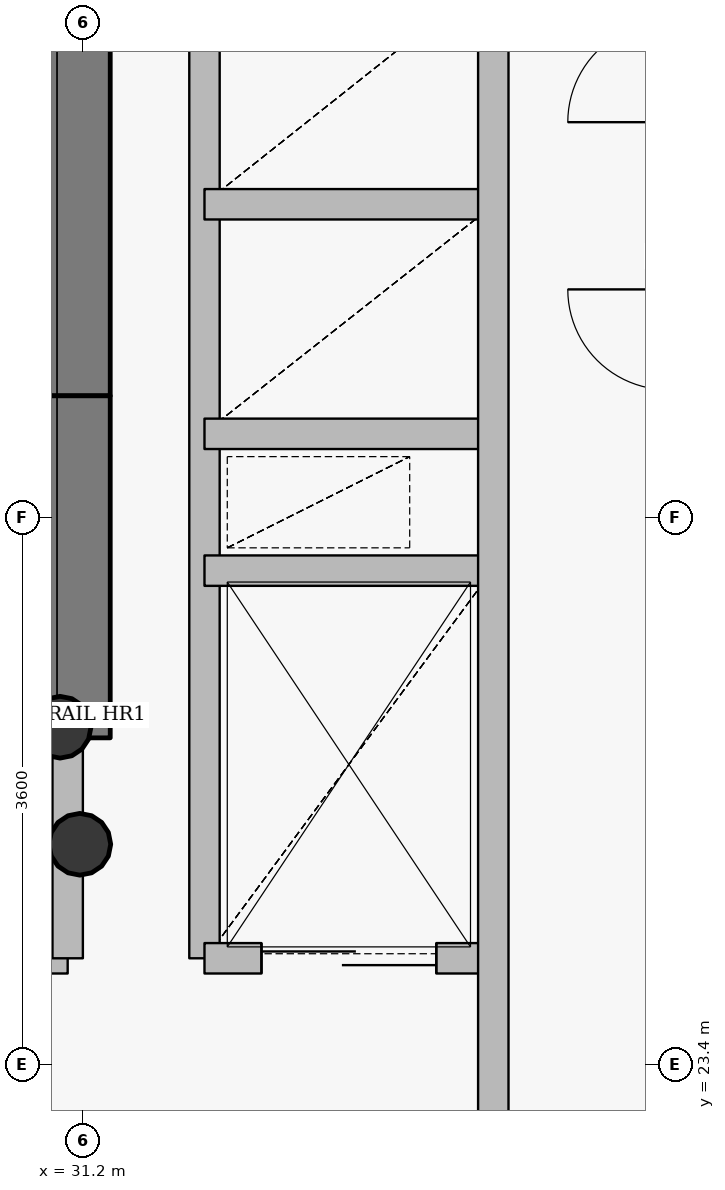
"""IFC4 building model, lengths in metres.
Left out: names, types, materials, properties, quantities, classifications, styles, units other than length and angle.
Written with IfcOpenShell. Run it as: python <this file> out.ifc"""

import sys

from ifc_helpers import new_model, si_unit, direction, frame, frame_2d, origin, origin_2d, place, context, subcontext, project, spatial, rectangle, hollow_circle, extrude, source, transform, mapped, element, fill, save


model = new_model("IFC4")
c1 = context("Model", 3, precision=1e-05, world=origin(), true_north=direction((0.0, 1.0)))
c2 = subcontext(c1, "Body", "Model", "MODEL_VIEW")
j1 = project(units=[si_unit("LENGTHUNIT", "METRE"), si_unit("PLANEANGLEUNIT", "RADIAN")], contexts=[c1])
p1 = place(None, origin())
s1 = spatial("IfcSite", under=j1, at=p1, CompositionType="ELEMENT")
p2 = place(p1, origin())
s2 = spatial("IfcBuilding", under=s1, at=p2, CompositionType="ELEMENT")
p3 = place(p2, frame((0.0, 0.0, 66.0)))
s3 = spatial("IfcBuildingStorey", under=s2, at=p3, CompositionType="ELEMENT", Elevation=66.0)
p4 = place(p3, frame((31.18, 27.8, 0.0), z_axis=(0.0, 0.0, 1.0), x_axis=(0.0, 1.0, 0.0)))
e1 = element("IfcWall", 1, at=p4, inside=s3, PredefinedType="SHEAR", context=c2, shape_type="SweptSolid", body=[
    extrude(rectangle(XDim=4.9, YDim=0.4, at=frame_2d((2.45, 0.0))), origin(), (0.0, 0.0, 1.0), 4.2),
])
for number, where, z_axis, x_axis in (
    (2, (31.05, 25.62, 0.0), (0.0, 0.0, 1.0), (1.0, 0.0, 0.0)),
    (3, (31.18, 24.85, 0.0), (0.0, 0.0, 1.0), (1.0, 0.0, 0.0)),
):
    element("IfcColumn", number, at=place(p3, frame(where, z_axis=z_axis, x_axis=x_axis)), inside=s3, PredefinedType="COLUMN", context=c2, shape_type="SweptSolid", body=[
        extrude(hollow_circle(Radius=0.203, WallThickness=0.016, at=origin_2d()), origin(), (0.0, 0.0, 1.0), 4.2),
    ])
p5 = place(p3, frame((31.18, 25.55, 0.0), z_axis=(0.0, 0.0, 1.0), x_axis=(0.0, 1.0, 0.0)))
e4 = element("IfcWall", 4, at=p5, inside=s3, PredefinedType="SHEAR", context=c2, shape_type="SweptSolid", body=[
    extrude(rectangle(XDim=2.25, YDim=0.4, at=frame_2d((1.125, 0.0))), origin(), (0.0, 0.0, 1.0), 3.55),
])
p6 = place(p3, frame((27.56, 24.1, 0.0), z_axis=(0.0, 0.0, 1.0), x_axis=(1.0, 0.0, 0.0)))
e5 = element("IfcWall", 5, at=p6, inside=s3, PredefinedType="PARTITIONING", context=c2, shape_type="SweptSolid", body=[
    extrude(rectangle(XDim=3.54, YDim=0.2, at=frame_2d((1.77, 0.0))), origin(), (0.0, 0.0, 1.0), 3.95),
])
p7 = place(p6, frame((1.17, 0.0, 0.0)))
e6 = element("IfcOpeningElement", 6, at=p7, cuts=e5, PredefinedType="OPENING", context=c2, shape_type="SweptSolid", body=[
    extrude(rectangle(XDim=1.2, YDim=2.15, at=origin_2d()), frame((0.6, 0.11, 1.075), z_axis=(0.0, -1.0, 0.0), x_axis=(1.0, 0.0, 0.0)), (0.0, 0.0, 1.0), 0.22),
])
p8 = place(p3, frame((31.1, 24.1, 0.0), z_axis=(0.0, 0.0, 1.0), x_axis=(0.0, 1.0, 0.0)))
e7 = element("IfcWall", 7, at=p8, inside=s3, PredefinedType="PARTITIONING", context=c2, shape_type="SweptSolid", body=[
    extrude(rectangle(XDim=1.44, YDim=0.2, at=frame_2d((0.72, 0.0))), origin(), (0.0, 0.0, 1.0), 3.95),
])
p9 = place(p3, frame((32.0, 24.1, 0.0), z_axis=(0.0, 0.0, 1.0), x_axis=(0.0, 1.0, 0.0)))
e8 = element("IfcWall", 8, at=p9, inside=s3, PredefinedType="PARTITIONING", context=c2, shape_type="SweptSolid", body=[
    extrude(rectangle(XDim=8.0, YDim=0.2, at=frame_2d((4.0, 0.0))), origin(), (0.0, 0.0, 1.0), 3.95),
])
p10 = place(p3, frame((32.0, 24.1, 0.0), z_axis=(0.0, 0.0, 1.0), x_axis=(1.0, 0.0, 0.0)))
e9 = element("IfcWall", 9, at=p10, inside=s3, PredefinedType="PARTITIONING", context=c2, shape_type="SweptSolid", body=[
    extrude(rectangle(XDim=1.9, YDim=0.2, at=frame_2d((0.95, 0.0))), origin(), (0.0, 0.0, 1.0), 3.535),
])
p11 = place(p10, frame((0.375, 0.0, 0.0)))
e10 = element("IfcOpeningElement", 10, at=p11, cuts=e9, PredefinedType="OPENING", context=c2, shape_type="SweptSolid", body=[
    extrude(rectangle(XDim=1.15, YDim=2.15, at=origin_2d()), frame((0.575, 0.11, 1.075), z_axis=(0.0, -1.0, 0.0), x_axis=(1.0, 0.0, 0.0)), (0.0, 0.0, 1.0), 0.22),
])
for number, where, z_axis, x_axis in (
    (11, (32.0, 26.65, 0.0), (0.0, 0.0, 1.0), (1.0, 0.0, 0.0)),
    (12, (32.0, 27.55, 0.0), (0.0, 0.0, 1.0), (1.0, 0.0, 0.0)),
    (13, (32.0, 29.06, 0.0), (0.0, 0.0, 1.0), (1.0, 0.0, 0.0)),
):
    element("IfcWall", number, at=place(p3, frame(where, z_axis=z_axis, x_axis=x_axis)), inside=s3, PredefinedType="PARTITIONING", context=c2, shape_type="SweptSolid", body=[
        extrude(rectangle(XDim=1.9, YDim=0.2, at=frame_2d((0.95, 0.0))), origin(), (0.0, 0.0, 1.0), 3.535),
    ])
p12 = place(p3, frame((33.9, 20.7, 0.0), z_axis=(0.0, 0.0, 1.0), x_axis=(0.0, 1.0, 0.0)))
e14 = element("IfcWall", 14, at=p12, inside=s3, PredefinedType="PARTITIONING", context=c2, shape_type="SweptSolid", body=[
    extrude(rectangle(XDim=11.4, YDim=0.2, at=frame_2d((5.7, 0.0))), origin(), (0.0, 0.0, 1.0), 3.535),
])
m1 = source(origin(), c2, "Body", "SweptSolid", [
    extrude(rectangle(XDim=1.15, YDim=2.15, at=origin_2d()), frame((0.575, 0.025, 1.075), z_axis=(0.0, -1.0, 0.0), x_axis=(1.0, 0.0, 0.0)), (0.0, 0.0, 1.0), 0.05),
])
p13 = place(p11, origin())
e15 = element("IfcDoor", 15, at=p13, inside=s3, OperationType="DOUBLE_DOOR_SLIDING", PredefinedType="USERDEFINED", context=c2, shape_type="MappedRepresentation", body=[
    mapped(m1, transform((0.0, 0.0, 0.0), x_axis=(1.0, 0.0, 0.0), y_axis=(0.0, 1.0, 0.0), z_axis=(0.0, 0.0, 1.0), scale=1.0)),
])
fill(e10, e15)
save(model, sys.argv[1])
